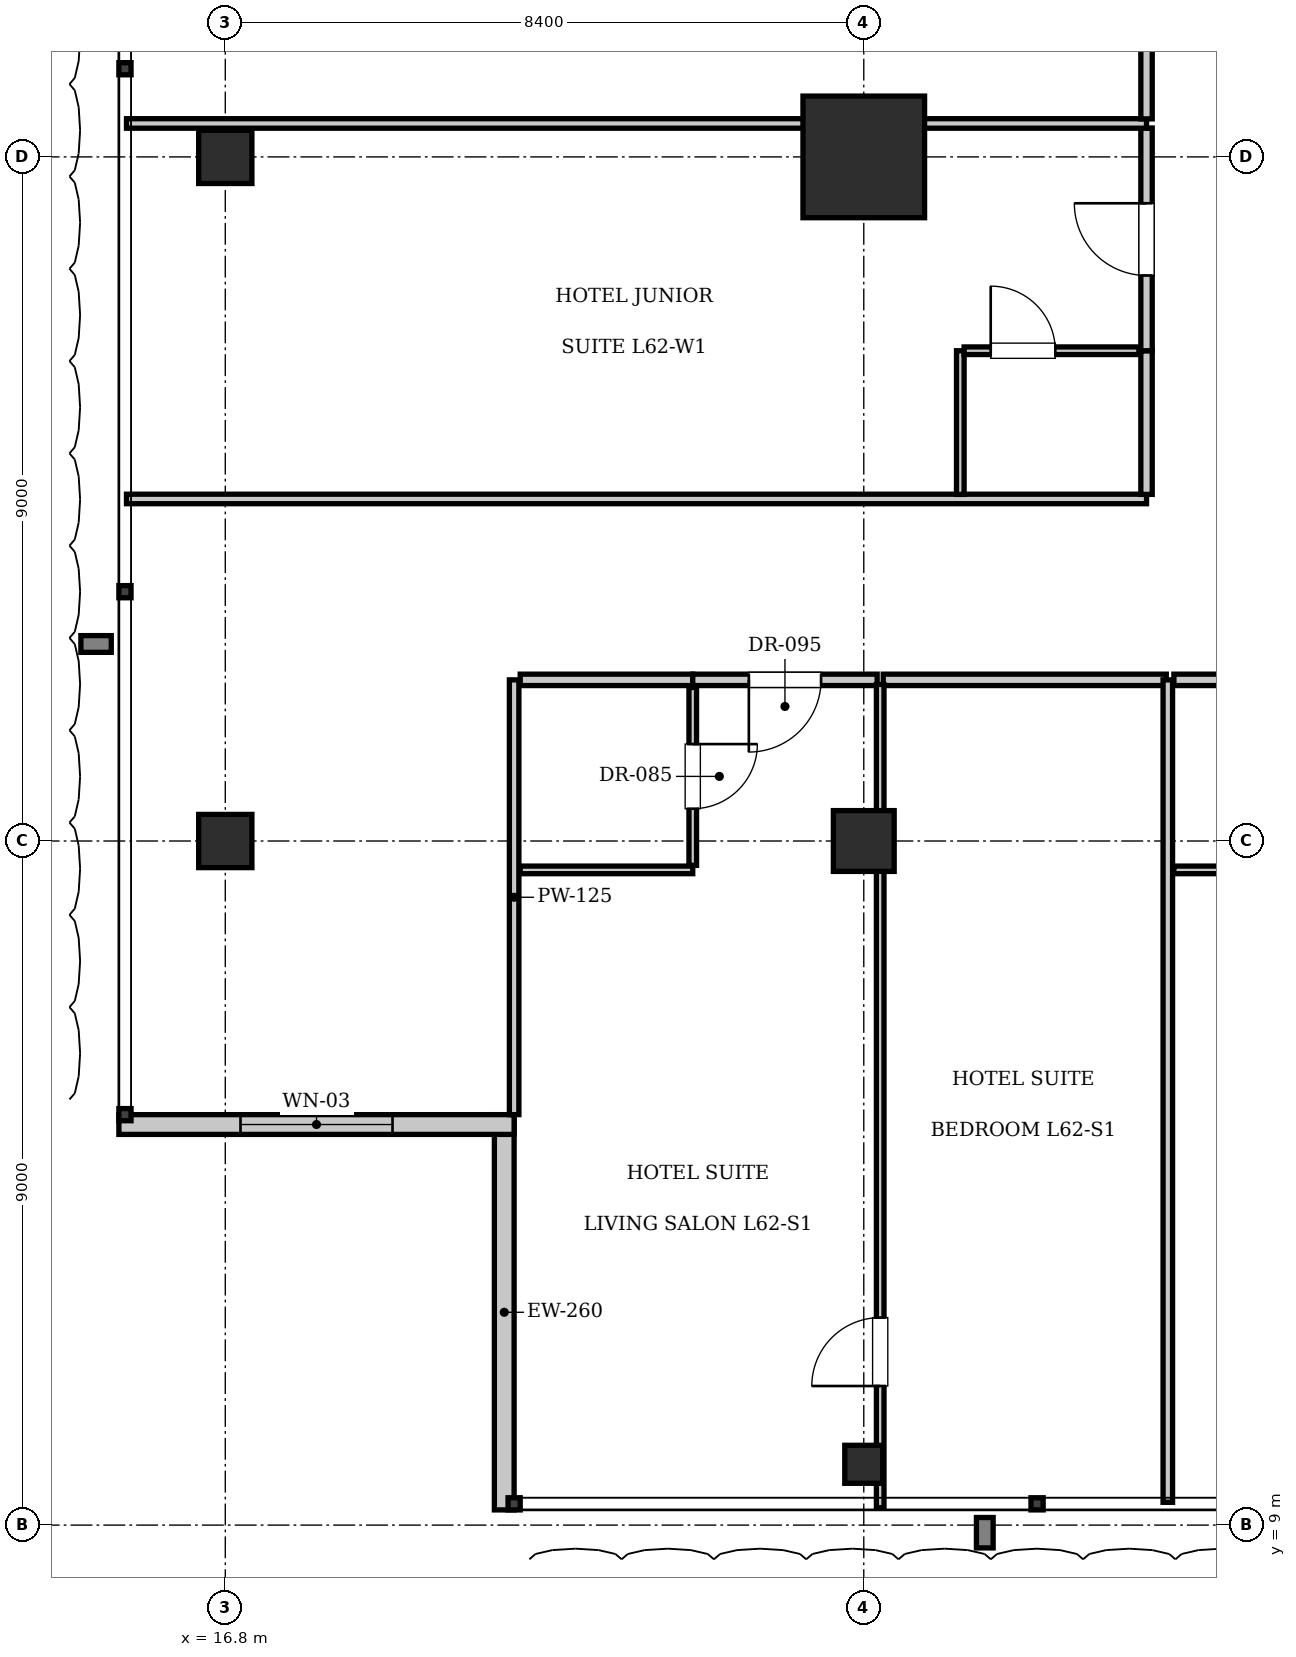
"""IFC4 building model, lengths in metres.
Left out: names, types, materials, properties, quantities, classifications, styles, units other than length and angle.
Written with IfcOpenShell. Run it as: python <this file> out.ifc"""

import sys

from ifc_helpers import new_model, si_unit, direction, frame, frame_2d, origin, origin_2d, place, context, subcontext, project, spatial, rectangle, i_section, extrude, element, fill, save


model = new_model("IFC4")
c1 = context("Model", 3, precision=1e-05, world=origin(), true_north=direction((0.0, 1.0)))
c2 = subcontext(c1, "Body", "Model", "MODEL_VIEW")
j1 = project(units=[si_unit("LENGTHUNIT", "METRE"), si_unit("PLANEANGLEUNIT", "RADIAN")], contexts=[c1])
p1 = place(None, origin())
s1 = spatial("IfcSite", under=j1, at=p1, CompositionType="ELEMENT")
p2 = place(p1, origin())
s2 = spatial("IfcBuilding", under=s1, at=p2, CompositionType="ELEMENT")
p3 = place(p2, frame((0.0, 0.0, 254.8)))
s3 = spatial("IfcBuildingStorey", under=s2, at=p3, CompositionType="ELEMENT", Elevation=254.8)
p4 = place(p3, frame((25.2, 27.0, 0.0), z_axis=(0.0, 0.0, 1.0), x_axis=(1.0, 0.0, 0.0)))
e1 = element("IfcColumn", 1, at=p4, inside=s3, PredefinedType="COLUMN", context=c2, shape_type="SweptSolid", body=[
    extrude(rectangle(XDim=1.6, YDim=1.6, at=origin_2d()), origin(), (0.0, 0.0, 1.0), 3.85),
])
p5 = place(p3, frame((25.2, 18.0, 0.0), z_axis=(0.0, 0.0, 1.0), x_axis=(1.0, 0.0, 0.0)))
e2 = element("IfcColumn", 2, at=p5, inside=s3, PredefinedType="COLUMN", context=c2, shape_type="SweptSolid", body=[
    extrude(rectangle(XDim=0.8, YDim=0.8, at=origin_2d()), origin(), (0.0, 0.0, 1.0), 3.85),
])
for number, where, z_axis, x_axis in (
    (3, (16.8, 18.0, 0.0), (0.0, 0.0, 1.0), (1.0, 0.0, 0.0)),
    (4, (16.8, 27.0, 0.0), (0.0, 0.0, 1.0), (1.0, 0.0, 0.0)),
):
    element("IfcColumn", number, at=place(p3, frame(where, z_axis=z_axis, x_axis=x_axis)), inside=s3, PredefinedType="COLUMN", context=c2, shape_type="SweptSolid", body=[
        extrude(rectangle(XDim=0.7, YDim=0.7, at=origin_2d()), origin(), (0.0, 0.0, 1.0), 3.85),
    ])
p6 = place(p3, frame((25.2, 9.8, 0.0), z_axis=(0.0, 0.0, 1.0), x_axis=(1.0, 0.0, 0.0)))
e5 = element("IfcColumn", 5, at=p6, inside=s3, PredefinedType="COLUMN", context=c2, shape_type="SweptSolid", body=[
    extrude(i_section(OverallWidth=0.5, OverallDepth=0.5, WebThickness=0.022, FlangeThickness=0.032, at=origin_2d()), origin(), (0.0, 0.0, 1.0), 3.85),
])
p7 = place(p3, frame((20.47, 9.2, 0.0), z_axis=(0.0, 0.0, 1.0), x_axis=(0.0, 1.0, 0.0)))
e6 = element("IfcWall", 6, at=p7, inside=s3, PredefinedType="SOLIDWALL", context=c2, shape_type="SweptSolid", body=[
    extrude(rectangle(XDim=5.2, YDim=0.26, at=frame_2d((2.6, 0.0))), origin(), (0.0, 0.0, 1.0), 3.61),
])
p8 = place(p3, frame((20.6, 14.27, 0.0), z_axis=(0.0, 0.0, 1.0), x_axis=(-1.0, 0.0, 0.0)))
e7 = element("IfcWall", 7, at=p8, inside=s3, PredefinedType="SOLIDWALL", context=c2, shape_type="SweptSolid", body=[
    extrude(rectangle(XDim=5.2, YDim=0.26, at=frame_2d((2.6, 0.0))), origin(), (0.0, 0.0, 1.0), 3.61),
])
p9 = place(p8, frame((1.6, 0.0, 0.9)))
e8 = element("IfcOpeningElement", 8, at=p9, cuts=e7, PredefinedType="OPENING", context=c2, shape_type="SweptSolid", body=[
    extrude(rectangle(XDim=2.0, YDim=2.2, at=frame_2d((1.0, 1.1))), frame((0.0, 0.14, 0.0), z_axis=(0.0, -1.0, 0.0), x_axis=(1.0, 0.0, 0.0)), (0.0, 0.0, 1.0), 0.28),
])
p10 = place(p3, frame((20.6, 14.4, 0.0), z_axis=(0.0, 0.0, 1.0), x_axis=(0.0, 1.0, 0.0)))
e9 = element("IfcWall", 9, at=p10, inside=s3, PredefinedType="PARTITIONING", context=c2, shape_type="SweptSolid", body=[
    extrude(rectangle(XDim=5.72, YDim=0.125, at=frame_2d((2.86, 0.0))), origin(), (0.0, 0.0, 1.0), 3.61),
])
p11 = place(p3, frame((20.68, 20.12, 0.0), z_axis=(0.0, 0.0, 1.0), x_axis=(1.0, 0.0, 0.0)))
e10 = element("IfcWall", 10, at=p11, inside=s3, PredefinedType="PARTITIONING", context=c2, shape_type="SweptSolid", body=[
    extrude(rectangle(XDim=2.27, YDim=0.15, at=frame_2d((1.135, 0.0))), origin(), (0.0, 0.0, 1.0), 3.61),
])
p12 = place(p3, frame((20.68, 17.62, 0.0), z_axis=(0.0, 0.0, 1.0), x_axis=(1.0, 0.0, 0.0)))
e11 = element("IfcWall", 11, at=p12, inside=s3, PredefinedType="PARTITIONING", context=c2, shape_type="SweptSolid", body=[
    extrude(rectangle(XDim=2.27, YDim=0.1, at=frame_2d((1.135, 0.0))), origin(), (0.0, 0.0, 1.0), 3.61),
])
p13 = place(p3, frame((22.95, 17.68, 0.0), z_axis=(0.0, 0.0, 1.0), x_axis=(0.0, 1.0, 0.0)))
e12 = element("IfcWall", 12, at=p13, inside=s3, PredefinedType="PARTITIONING", context=c2, shape_type="SweptSolid", body=[
    extrude(rectangle(XDim=2.34, YDim=0.1, at=frame_2d((1.17, 0.0))), origin(), (0.0, 0.0, 1.0), 3.61),
])
p14 = place(p13, frame((0.745, 0.0, 0.0)))
e13 = element("IfcOpeningElement", 13, at=p14, cuts=e12, PredefinedType="OPENING", context=c2, shape_type="SweptSolid", body=[
    extrude(rectangle(XDim=0.85, YDim=2.1, at=frame_2d((0.425, 1.05))), frame((0.0, 0.06, 0.0), z_axis=(0.0, -1.0, 0.0), x_axis=(1.0, 0.0, 0.0)), (0.0, 0.0, 1.0), 0.12),
])
p15 = place(p3, frame((22.95, 20.12, 0.0), z_axis=(0.0, 0.0, 1.0), x_axis=(1.0, 0.0, 0.0)))
e14 = element("IfcWall", 14, at=p15, inside=s3, PredefinedType="PARTITIONING", context=c2, shape_type="SweptSolid", body=[
    extrude(rectangle(XDim=2.426, YDim=0.15, at=frame_2d((1.213, 0.0))), origin(), (0.0, 0.0, 1.0), 3.61),
])
p16 = place(p15, frame((0.738, 0.0, 0.0)))
e15 = element("IfcOpeningElement", 15, at=p16, cuts=e14, PredefinedType="OPENING", context=c2, shape_type="SweptSolid", body=[
    extrude(rectangle(XDim=0.95, YDim=2.15, at=frame_2d((0.475, 1.075))), frame((0.0, 0.085, 0.0), z_axis=(0.0, -1.0, 0.0), x_axis=(1.0, 0.0, 0.0)), (0.0, 0.0, 1.0), 0.17),
])
p17 = place(p3, frame((25.456, 20.12, 0.0), z_axis=(0.0, 0.0, 1.0), x_axis=(1.0, 0.0, 0.0)))
e16 = element("IfcWall", 16, at=p17, inside=s3, PredefinedType="PARTITIONING", context=c2, shape_type="SweptSolid", body=[
    extrude(rectangle(XDim=3.724, YDim=0.15, at=frame_2d((1.862, 0.0))), origin(), (0.0, 0.0, 1.0), 3.61),
])
p18 = place(p3, frame((25.416, 9.23, 0.0), z_axis=(0.0, 0.0, 1.0), x_axis=(0.0, 1.0, 0.0)))
e17 = element("IfcWall", 17, at=p18, inside=s3, PredefinedType="PARTITIONING", context=c2, shape_type="SweptSolid", body=[
    extrude(rectangle(XDim=10.83, YDim=0.1, at=frame_2d((5.415, 0.0))), origin(), (0.0, 0.0, 1.0), 3.61),
])
p19 = place(p18, frame((1.6, 0.0, 0.0)))
e18 = element("IfcOpeningElement", 18, at=p19, cuts=e17, PredefinedType="OPENING", context=c2, shape_type="SweptSolid", body=[
    extrude(rectangle(XDim=0.9, YDim=2.1, at=frame_2d((0.45, 1.05))), frame((0.0, 0.06, 0.0), z_axis=(0.0, -1.0, 0.0), x_axis=(1.0, 0.0, 0.0)), (0.0, 0.0, 1.0), 0.12),
])
p20 = place(p3, frame((29.2, 9.3, 0.0), z_axis=(0.0, 0.0, 1.0), x_axis=(0.0, 1.0, 0.0)))
e19 = element("IfcWall", 19, at=p20, inside=s3, PredefinedType="PARTITIONING", context=c2, shape_type="SweptSolid", body=[
    extrude(rectangle(XDim=10.82, YDim=0.125, at=frame_2d((5.41, 0.0))), origin(), (0.0, 0.0, 1.0), 3.61),
])
p21 = place(p3, frame((29.28, 20.12, 0.0), z_axis=(0.0, 0.0, 1.0), x_axis=(1.0, 0.0, 0.0)))
e20 = element("IfcWall", 20, at=p21, inside=s3, PredefinedType="PARTITIONING", context=c2, shape_type="SweptSolid", body=[
    extrude(rectangle(XDim=2.27, YDim=0.15, at=frame_2d((1.135, 0.0))), origin(), (0.0, 0.0, 1.0), 3.61),
])
p22 = place(p3, frame((29.28, 17.62, 0.0), z_axis=(0.0, 0.0, 1.0), x_axis=(1.0, 0.0, 0.0)))
e21 = element("IfcWall", 21, at=p22, inside=s3, PredefinedType="PARTITIONING", context=c2, shape_type="SweptSolid", body=[
    extrude(rectangle(XDim=2.27, YDim=0.1, at=frame_2d((1.135, 0.0))), origin(), (0.0, 0.0, 1.0), 3.61),
])
p23 = place(p3, frame((15.5, 22.5, 0.0), z_axis=(0.0, 0.0, 1.0), x_axis=(1.0, 0.0, 0.0)))
e22 = element("IfcWall", 22, at=p23, inside=s3, PredefinedType="PARTITIONING", context=c2, shape_type="SweptSolid", body=[
    extrude(rectangle(XDim=13.42, YDim=0.125, at=frame_2d((6.71, 0.0))), origin(), (0.0, 0.0, 1.0), 3.61),
])
p24 = place(p3, frame((28.92, 22.56, 0.0), z_axis=(0.0, 0.0, 1.0), x_axis=(0.0, 1.0, 0.0)))
e23 = element("IfcWall", 23, at=p24, inside=s3, PredefinedType="PARTITIONING", context=c2, shape_type="SweptSolid", body=[
    extrude(rectangle(XDim=1.89, YDim=0.15, at=frame_2d((0.945, 0.0))), origin(), (0.0, 0.0, 1.0), 3.61),
])
p25 = place(p3, frame((28.92, 24.45, 0.0), z_axis=(0.0, 0.0, 1.0), x_axis=(0.0, 1.0, 0.0)))
e24 = element("IfcWall", 24, at=p25, inside=s3, PredefinedType="PARTITIONING", context=c2, shape_type="SweptSolid", body=[
    extrude(rectangle(XDim=2.93, YDim=0.15, at=frame_2d((1.465, 0.0))), origin(), (0.0, 0.0, 1.0), 3.61),
])
p26 = place(p25, frame((0.99, 0.0, 0.0)))
e25 = element("IfcOpeningElement", 25, at=p26, cuts=e24, PredefinedType="OPENING", context=c2, shape_type="SweptSolid", body=[
    extrude(rectangle(XDim=0.95, YDim=2.15, at=frame_2d((0.475, 1.075))), frame((0.0, 0.085, 0.0), z_axis=(0.0, -1.0, 0.0), x_axis=(1.0, 0.0, 0.0)), (0.0, 0.0, 1.0), 0.17),
])
p27 = place(p3, frame((26.47, 22.56, 0.0), z_axis=(0.0, 0.0, 1.0), x_axis=(0.0, 1.0, 0.0)))
e26 = element("IfcWall", 26, at=p27, inside=s3, PredefinedType="PARTITIONING", context=c2, shape_type="SweptSolid", body=[
    extrude(rectangle(XDim=1.89, YDim=0.1, at=frame_2d((0.945, 0.0))), origin(), (0.0, 0.0, 1.0), 3.61),
])
p28 = place(p3, frame((26.52, 24.45, 0.0), z_axis=(0.0, 0.0, 1.0), x_axis=(1.0, 0.0, 0.0)))
e27 = element("IfcWall", 27, at=p28, inside=s3, PredefinedType="PARTITIONING", context=c2, shape_type="SweptSolid", body=[
    extrude(rectangle(XDim=2.3, YDim=0.1, at=frame_2d((1.15, 0.0))), origin(), (0.0, 0.0, 1.0), 3.61),
])
p29 = place(p28, frame((0.35, 0.0, 0.0)))
e28 = element("IfcOpeningElement", 28, at=p29, cuts=e27, PredefinedType="OPENING", context=c2, shape_type="SweptSolid", body=[
    extrude(rectangle(XDim=0.85, YDim=2.1, at=frame_2d((0.425, 1.05))), frame((0.0, 0.06, 0.0), z_axis=(0.0, -1.0, 0.0), x_axis=(1.0, 0.0, 0.0)), (0.0, 0.0, 1.0), 0.12),
])
p30 = place(p3, frame((15.5, 27.44, 0.0), z_axis=(0.0, 0.0, 1.0), x_axis=(1.0, 0.0, 0.0)))
e29 = element("IfcWall", 29, at=p30, inside=s3, PredefinedType="PARTITIONING", context=c2, shape_type="SweptSolid", body=[
    extrude(rectangle(XDim=13.42, YDim=0.125, at=frame_2d((6.71, 0.0))), origin(), (0.0, 0.0, 1.0), 3.61),
])
p31 = place(p3, frame((28.92, 27.5, 0.0), z_axis=(0.0, 0.0, 1.0), x_axis=(0.0, 1.0, 0.0)))
e30 = element("IfcWall", 30, at=p31, inside=s3, PredefinedType="PARTITIONING", context=c2, shape_type="SweptSolid", body=[
    extrude(rectangle(XDim=2.93, YDim=0.15, at=frame_2d((1.465, 0.0))), origin(), (0.0, 0.0, 1.0), 3.61),
])
p32 = place(p31, frame((0.99, 0.0, 0.0)))
e31 = element("IfcOpeningElement", 31, at=p32, cuts=e30, PredefinedType="OPENING", context=c2, shape_type="SweptSolid", body=[
    extrude(rectangle(XDim=0.95, YDim=2.15, at=frame_2d((0.475, 1.075))), frame((0.0, 0.085, 0.0), z_axis=(0.0, -1.0, 0.0), x_axis=(1.0, 0.0, 0.0)), (0.0, 0.0, 1.0), 0.17),
])
p33 = place(p9, origin())
e32 = element("IfcWindow", 32, at=p33, inside=s3, PartitioningType="SINGLE_PANEL", PredefinedType="WINDOW", context=c2, shape_type="SweptSolid", body=[
    extrude(rectangle(XDim=2.0, YDim=2.2, at=frame_2d((1.0, 1.1))), frame((0.0, 0.03, 0.0), z_axis=(0.0, -1.0, 0.0), x_axis=(1.0, 0.0, 0.0)), (0.0, 0.0, 1.0), 0.06),
])
fill(e8, e32)
p34 = place(p14, frame((0.85, 0.0, 0.0), z_axis=(0.0, 0.0, 1.0), x_axis=(-1.0, 0.0, 0.0)))
e33 = element("IfcDoor", 33, at=p34, inside=s3, OperationType="SINGLE_SWING_LEFT", PredefinedType="DOOR", context=c2, shape_type="SweptSolid", body=[
    extrude(rectangle(XDim=0.85, YDim=2.1, at=frame_2d((0.425, 1.05))), frame((0.0, 0.025, 0.0), z_axis=(0.0, -1.0, 0.0), x_axis=(1.0, 0.0, 0.0)), (0.0, 0.0, 1.0), 0.05),
])
fill(e13, e33)
p35 = place(p16, frame((0.95, 0.0, 0.0), z_axis=(0.0, 0.0, 1.0), x_axis=(-1.0, 0.0, 0.0)))
e34 = element("IfcDoor", 34, at=p35, inside=s3, OperationType="SINGLE_SWING_RIGHT", PredefinedType="DOOR", context=c2, shape_type="SweptSolid", body=[
    extrude(rectangle(XDim=0.95, YDim=2.15, at=frame_2d((0.475, 1.075))), frame((0.0, 0.025, 0.0), z_axis=(0.0, -1.0, 0.0), x_axis=(1.0, 0.0, 0.0)), (0.0, 0.0, 1.0), 0.05),
])
fill(e15, e34)
p36 = place(p19, origin())
e35 = element("IfcDoor", 35, at=p36, inside=s3, OperationType="SINGLE_SWING_LEFT", PredefinedType="DOOR", context=c2, shape_type="SweptSolid", body=[
    extrude(rectangle(XDim=0.9, YDim=2.1, at=frame_2d((0.45, 1.05))), frame((0.0, 0.025, 0.0), z_axis=(0.0, -1.0, 0.0), x_axis=(1.0, 0.0, 0.0)), (0.0, 0.0, 1.0), 0.05),
])
fill(e18, e35)
p37 = place(p29, origin())
e36 = element("IfcDoor", 36, at=p37, inside=s3, OperationType="SINGLE_SWING_LEFT", PredefinedType="DOOR", context=c2, shape_type="SweptSolid", body=[
    extrude(rectangle(XDim=0.85, YDim=2.1, at=frame_2d((0.425, 1.05))), frame((0.0, 0.025, 0.0), z_axis=(0.0, -1.0, 0.0), x_axis=(1.0, 0.0, 0.0)), (0.0, 0.0, 1.0), 0.05),
])
fill(e28, e36)
p38 = place(p26, origin())
e37 = element("IfcDoor", 37, at=p38, inside=s3, OperationType="SINGLE_SWING_RIGHT", PredefinedType="DOOR", context=c2, shape_type="SweptSolid", body=[
    extrude(rectangle(XDim=0.95, YDim=2.15, at=frame_2d((0.475, 1.075))), frame((0.0, 0.025, 0.0), z_axis=(0.0, -1.0, 0.0), x_axis=(1.0, 0.0, 0.0)), (0.0, 0.0, 1.0), 0.05),
])
fill(e25, e37)
save(model, sys.argv[1])
